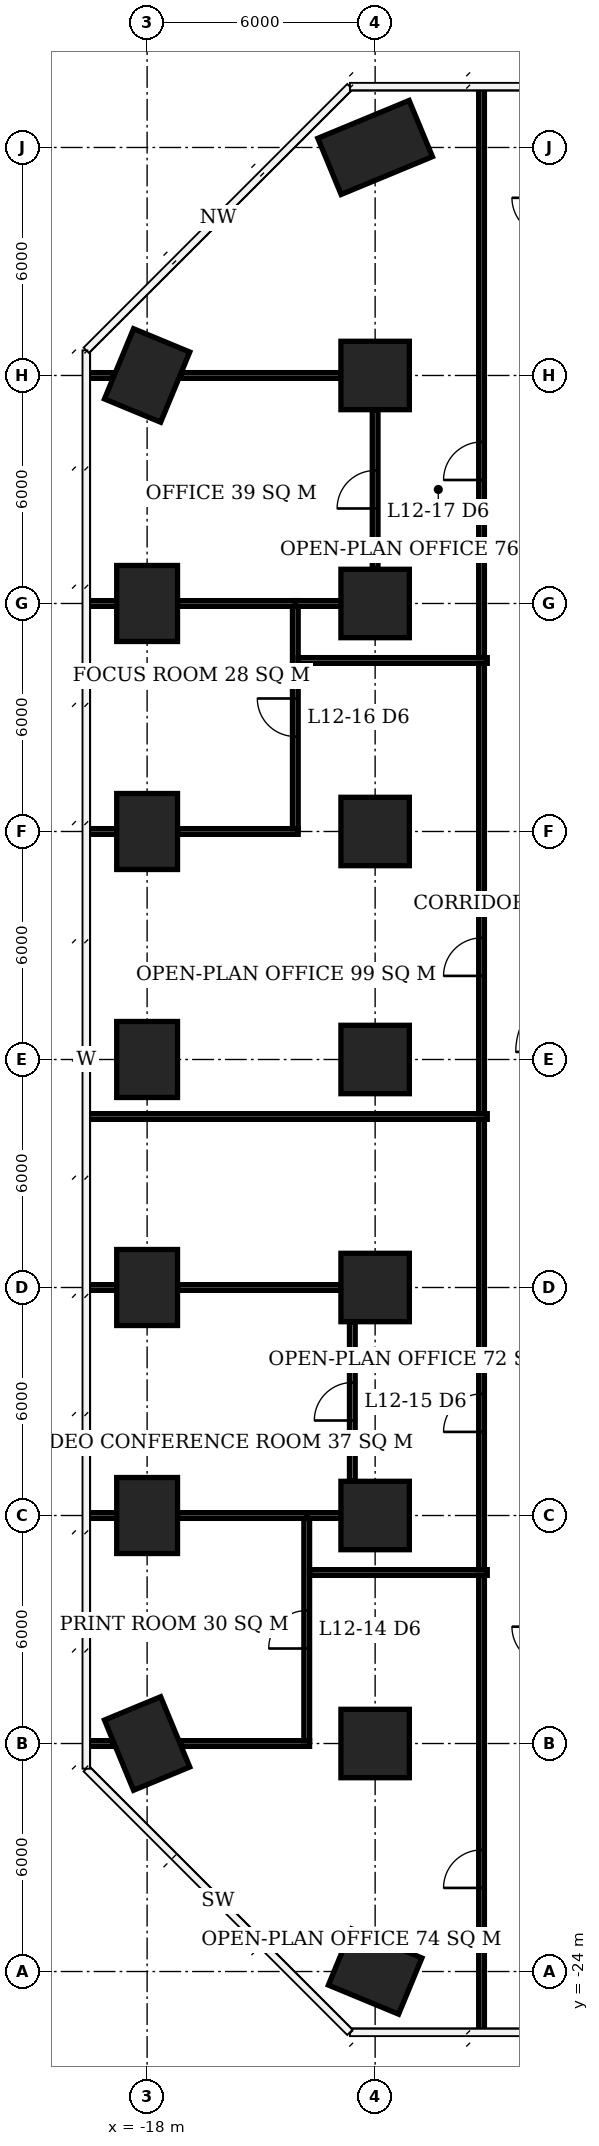
"""IFC4 building model, lengths in metres.
Left out: names, types, materials, properties, quantities, classifications, styles, units other than length and angle.
Written with IfcOpenShell. Run it as: python <this file> out.ifc"""

import sys

from ifc_helpers import new_model, si_unit, direction, frame, frame_2d, origin, origin_2d, place, context, subcontext, project, spatial, rectangle, extrude, element, fill, save


model = new_model("IFC4")
c1 = context("Model", 3, precision=1e-05, world=origin(), true_north=direction((0.0, 1.0)))
c2 = subcontext(c1, "Body", "Model", "MODEL_VIEW")
j1 = project(units=[si_unit("LENGTHUNIT", "METRE"), si_unit("PLANEANGLEUNIT", "RADIAN")], contexts=[c1])
p1 = place(None, origin())
s1 = spatial("IfcSite", under=j1, at=p1, CompositionType="ELEMENT")
p2 = place(p1, origin())
s2 = spatial("IfcBuilding", under=s1, at=p2, CompositionType="ELEMENT")
p3 = place(p2, frame((0.0, 0.0, 53.3)))
s3 = spatial("IfcBuildingStorey", under=s2, at=p3, CompositionType="ELEMENT", Elevation=53.3)
for number, where, z_axis, x_axis in (
    (1, (-18.0, -18.0, 0.0), (0.0, 0.0, 1.0), (-0.383, 0.924, 0.0)),
    (2, (-18.0, -12.0, 0.0), (0.0, 0.0, 1.0), (0.0, 1.0, 0.0)),
    (3, (-18.0, -6.0, 0.0), (0.0, 0.0, 1.0), (0.0, 1.0, 0.0)),
    (4, (-18.0, 0.0, 0.0), (0.0, 0.0, 1.0), (0.0, 1.0, 0.0)),
    (5, (-18.0, 6.0, 0.0), (0.0, 0.0, 1.0), (0.0, 1.0, 0.0)),
    (6, (-18.0, 12.0, 0.0), (0.0, 0.0, 1.0), (0.0, 1.0, 0.0)),
    (7, (-18.0, 18.0, 0.0), (0.0, 0.0, 1.0), (0.383, 0.924, 0.0)),
    (8, (-12.0, -24.0, 0.0), (0.0, 0.0, 1.0), (-0.924, 0.383, 0.0)),
):
    element("IfcColumn", number, at=place(p3, frame(where, z_axis=z_axis, x_axis=x_axis)), inside=s3, PredefinedType="COLUMN", context=c2, shape_type="SweptSolid", body=[
        extrude(rectangle(XDim=2.0, YDim=1.6, at=origin_2d()), origin(), (0.0, 0.0, 1.0), 3.9),
    ])
for number, where, z_axis, x_axis in (
    (9, (-12.0, -18.0, 0.0), (0.0, 0.0, 1.0), (1.0, 0.0, 0.0)),
    (10, (-12.0, -12.0, 0.0), (0.0, 0.0, 1.0), (1.0, 0.0, 0.0)),
    (11, (-12.0, -6.0, 0.0), (0.0, 0.0, 1.0), (1.0, 0.0, 0.0)),
    (12, (-12.0, 0.0, 0.0), (0.0, 0.0, 1.0), (1.0, 0.0, 0.0)),
    (13, (-12.0, 6.0, 0.0), (0.0, 0.0, 1.0), (1.0, 0.0, 0.0)),
    (14, (-12.0, 12.0, 0.0), (0.0, 0.0, 1.0), (1.0, 0.0, 0.0)),
    (15, (-12.0, 18.0, 0.0), (0.0, 0.0, 1.0), (1.0, 0.0, 0.0)),
):
    element("IfcColumn", number, at=place(p3, frame(where, z_axis=z_axis, x_axis=x_axis)), inside=s3, PredefinedType="COLUMN", context=c2, shape_type="SweptSolid", body=[
        extrude(rectangle(XDim=1.8, YDim=1.8, at=origin_2d()), origin(), (0.0, 0.0, 1.0), 3.9),
    ])
p4 = place(p3, frame((-12.0, 24.0, 0.0), z_axis=(0.0, 0.0, 1.0), x_axis=(0.923879532511, 0.382683432365, 0.0)))
e16 = element("IfcColumn", 16, at=p4, inside=s3, PredefinedType="COLUMN", context=c2, shape_type="SweptSolid", body=[
    extrude(rectangle(XDim=2.6, YDim=1.6, at=origin_2d()), origin(), (0.0, 0.0, 1.0), 3.9),
])
p5 = place(p3, frame((-19.6, -18.0, 0.0), z_axis=(0.0, 0.0, 1.0), x_axis=(1.0, 0.0, 0.0)))
e17 = element("IfcWall", 17, at=p5, inside=s3, PredefinedType="PARTITIONING", context=c2, shape_type="SweptSolid", body=[
    extrude(rectangle(XDim=0.703, YDim=0.15, at=frame_2d((0.352, 0.0))), origin(), (0.0, 0.0, 1.0), 3.65),
])
p6 = place(p3, frame((-17.103, -18.0, 0.0), z_axis=(0.0, 0.0, 1.0), x_axis=(1.0, 0.0, 0.0)))
e18 = element("IfcWall", 18, at=p6, inside=s3, PredefinedType="PARTITIONING", context=c2, shape_type="SweptSolid", body=[
    extrude(rectangle(XDim=3.378, YDim=0.15, at=frame_2d((1.689, 0.0))), origin(), (0.0, 0.0, 1.0), 3.65),
])
p7 = place(p3, frame((-19.6, -12.0, 0.0), z_axis=(0.0, 0.0, 1.0), x_axis=(1.0, 0.0, 0.0)))
e19 = element("IfcWall", 19, at=p7, inside=s3, PredefinedType="PARTITIONING", context=c2, shape_type="SweptSolid", body=[
    extrude(rectangle(XDim=0.8, YDim=0.15, at=frame_2d((0.4, 0.0))), origin(), (0.0, 0.0, 1.0), 3.65),
])
p8 = place(p3, frame((-17.2, -12.0, 0.0), z_axis=(0.0, 0.0, 1.0), x_axis=(1.0, 0.0, 0.0)))
e20 = element("IfcWall", 20, at=p8, inside=s3, PredefinedType="PARTITIONING", context=c2, shape_type="SweptSolid", body=[
    extrude(rectangle(XDim=3.475, YDim=0.15, at=frame_2d((1.737, 0.0))), origin(), (0.0, 0.0, 1.0), 3.65),
])
p9 = place(p3, frame((-13.8, -12.0, 0.0), z_axis=(0.0, 0.0, 1.0), x_axis=(1.0, 0.0, 0.0)))
e21 = element("IfcWall", 21, at=p9, inside=s3, PredefinedType="PARTITIONING", context=c2, shape_type="SweptSolid", body=[
    extrude(rectangle(XDim=0.9, YDim=0.15, at=frame_2d((0.45, 0.0))), origin(), (0.0, 0.0, 1.0), 3.65),
])
p10 = place(p3, frame((-19.6, -6.0, 0.0), z_axis=(0.0, 0.0, 1.0), x_axis=(1.0, 0.0, 0.0)))
e22 = element("IfcWall", 22, at=p10, inside=s3, PredefinedType="PARTITIONING", context=c2, shape_type="SweptSolid", body=[
    extrude(rectangle(XDim=0.8, YDim=0.15, at=frame_2d((0.4, 0.0))), origin(), (0.0, 0.0, 1.0), 3.65),
])
p11 = place(p3, frame((-17.2, -6.0, 0.0), z_axis=(0.0, 0.0, 1.0), x_axis=(1.0, 0.0, 0.0)))
e23 = element("IfcWall", 23, at=p11, inside=s3, PredefinedType="PARTITIONING", context=c2, shape_type="SweptSolid", body=[
    extrude(rectangle(XDim=4.3, YDim=0.15, at=frame_2d((2.15, 0.0))), origin(), (0.0, 0.0, 1.0), 3.65),
])
p12 = place(p3, frame((-19.6, 6.0, 0.0), z_axis=(0.0, 0.0, 1.0), x_axis=(1.0, 0.0, 0.0)))
e24 = element("IfcWall", 24, at=p12, inside=s3, PredefinedType="PARTITIONING", context=c2, shape_type="SweptSolid", body=[
    extrude(rectangle(XDim=0.8, YDim=0.15, at=frame_2d((0.4, 0.0))), origin(), (0.0, 0.0, 1.0), 3.65),
])
p13 = place(p3, frame((-17.2, 6.0, 0.0), z_axis=(0.0, 0.0, 1.0), x_axis=(1.0, 0.0, 0.0)))
e25 = element("IfcWall", 25, at=p13, inside=s3, PredefinedType="PARTITIONING", context=c2, shape_type="SweptSolid", body=[
    extrude(rectangle(XDim=3.175, YDim=0.15, at=frame_2d((1.587, 0.0))), origin(), (0.0, 0.0, 1.0), 3.65),
])
p14 = place(p3, frame((-19.6, 12.0, 0.0), z_axis=(0.0, 0.0, 1.0), x_axis=(1.0, 0.0, 0.0)))
e26 = element("IfcWall", 26, at=p14, inside=s3, PredefinedType="PARTITIONING", context=c2, shape_type="SweptSolid", body=[
    extrude(rectangle(XDim=0.8, YDim=0.15, at=frame_2d((0.4, 0.0))), origin(), (0.0, 0.0, 1.0), 3.65),
])
p15 = place(p3, frame((-17.2, 12.0, 0.0), z_axis=(0.0, 0.0, 1.0), x_axis=(1.0, 0.0, 0.0)))
e27 = element("IfcWall", 27, at=p15, inside=s3, PredefinedType="PARTITIONING", context=c2, shape_type="SweptSolid", body=[
    extrude(rectangle(XDim=3.175, YDim=0.15, at=frame_2d((1.587, 0.0))), origin(), (0.0, 0.0, 1.0), 3.65),
])
p16 = place(p3, frame((-14.1, 12.0, 0.0), z_axis=(0.0, 0.0, 1.0), x_axis=(1.0, 0.0, 0.0)))
e28 = element("IfcWall", 28, at=p16, inside=s3, PredefinedType="PARTITIONING", context=c2, shape_type="SweptSolid", body=[
    extrude(rectangle(XDim=1.2, YDim=0.15, at=frame_2d((0.6, 0.0))), origin(), (0.0, 0.0, 1.0), 3.65),
])
p17 = place(p3, frame((-19.6, 18.0, 0.0), z_axis=(0.0, 0.0, 1.0), x_axis=(1.0, 0.0, 0.0)))
e29 = element("IfcWall", 29, at=p17, inside=s3, PredefinedType="PARTITIONING", context=c2, shape_type="SweptSolid", body=[
    extrude(rectangle(XDim=0.703, YDim=0.15, at=frame_2d((0.352, 0.0))), origin(), (0.0, 0.0, 1.0), 3.65),
])
p18 = place(p3, frame((-17.103, 18.0, 0.0), z_axis=(0.0, 0.0, 1.0), x_axis=(1.0, 0.0, 0.0)))
e30 = element("IfcWall", 30, at=p18, inside=s3, PredefinedType="PARTITIONING", context=c2, shape_type="SweptSolid", body=[
    extrude(rectangle(XDim=4.203, YDim=0.15, at=frame_2d((2.102, 0.0))), origin(), (0.0, 0.0, 1.0), 3.65),
])
p19 = place(p3, frame((-14.1, 6.075, 0.0), z_axis=(0.0, 0.0, 1.0), x_axis=(0.0, 1.0, 0.0)))
e31 = element("IfcWall", 31, at=p19, inside=s3, PredefinedType="PARTITIONING", context=c2, shape_type="SweptSolid", body=[
    extrude(rectangle(XDim=5.85, YDim=0.15, at=frame_2d((2.925, 0.0))), origin(), (0.0, 0.0, 1.0), 3.65),
])
p20 = place(p19, frame((2.425, 0.0, 0.0)))
e32 = element("IfcOpeningElement", 32, at=p20, cuts=e31, PredefinedType="OPENING", context=c2, shape_type="SweptSolid", body=[
    extrude(rectangle(XDim=1.0, YDim=2.1, at=frame_2d((0.5, 1.05))), frame((0.0, 0.085, 0.0), z_axis=(0.0, -1.0, 0.0), x_axis=(1.0, 0.0, 0.0)), (0.0, 0.0, 1.0), 0.17),
])
p21 = place(p3, frame((-13.8, -17.925, 0.0), z_axis=(0.0, 0.0, 1.0), x_axis=(0.0, 1.0, 0.0)))
e33 = element("IfcWall", 33, at=p21, inside=s3, PredefinedType="PARTITIONING", context=c2, shape_type="SweptSolid", body=[
    extrude(rectangle(XDim=5.85, YDim=0.15, at=frame_2d((2.925, 0.0))), origin(), (0.0, 0.0, 1.0), 3.65),
])
p22 = place(p21, frame((2.425, 0.0, 0.0)))
e34 = element("IfcOpeningElement", 34, at=p22, cuts=e33, PredefinedType="OPENING", context=c2, shape_type="SweptSolid", body=[
    extrude(rectangle(XDim=1.0, YDim=2.1, at=frame_2d((0.5, 1.05))), frame((0.0, 0.085, 0.0), z_axis=(0.0, -1.0, 0.0), x_axis=(1.0, 0.0, 0.0)), (0.0, 0.0, 1.0), 0.17),
])
p23 = place(p3, frame((-12.6, -11.1, 0.0), z_axis=(0.0, 0.0, 1.0), x_axis=(0.0, 1.0, 0.0)))
e35 = element("IfcWall", 35, at=p23, inside=s3, PredefinedType="PARTITIONING", context=c2, shape_type="SweptSolid", body=[
    extrude(rectangle(XDim=4.2, YDim=0.15, at=frame_2d((2.1, 0.0))), origin(), (0.0, 0.0, 1.0), 3.65),
])
p24 = place(p23, frame((1.6, 0.0, 0.0)))
e36 = element("IfcOpeningElement", 36, at=p24, cuts=e35, PredefinedType="OPENING", context=c2, shape_type="SweptSolid", body=[
    extrude(rectangle(XDim=1.0, YDim=2.1, at=frame_2d((0.5, 1.05))), frame((0.0, 0.085, 0.0), z_axis=(0.0, -1.0, 0.0), x_axis=(1.0, 0.0, 0.0)), (0.0, 0.0, 1.0), 0.17),
])
p25 = place(p3, frame((-12.0, 12.9, 0.0), z_axis=(0.0, 0.0, 1.0), x_axis=(0.0, 1.0, 0.0)))
e37 = element("IfcWall", 37, at=p25, inside=s3, PredefinedType="PARTITIONING", context=c2, shape_type="SweptSolid", body=[
    extrude(rectangle(XDim=4.2, YDim=0.15, at=frame_2d((2.1, 0.0))), origin(), (0.0, 0.0, 1.0), 3.65),
])
p26 = place(p25, frame((1.6, 0.0, 0.0)))
e38 = element("IfcOpeningElement", 38, at=p26, cuts=e37, PredefinedType="OPENING", context=c2, shape_type="SweptSolid", body=[
    extrude(rectangle(XDim=1.0, YDim=2.1, at=frame_2d((0.5, 1.05))), frame((0.0, 0.085, 0.0), z_axis=(0.0, -1.0, 0.0), x_axis=(1.0, 0.0, 0.0)), (0.0, 0.0, 1.0), 0.17),
])
p27 = place(p3, frame((-19.6, -1.5, 0.0), z_axis=(0.0, 0.0, 1.0), x_axis=(1.0, 0.0, 0.0)))
e39 = element("IfcWall", 39, at=p27, inside=s3, PredefinedType="PARTITIONING", context=c2, shape_type="SweptSolid", body=[
    extrude(rectangle(XDim=10.55, YDim=0.15, at=frame_2d((5.275, 0.0))), origin(), (0.0, 0.0, 1.0), 3.65),
])
p28 = place(p3, frame((-14.025, 10.5, 0.0), z_axis=(0.0, 0.0, 1.0), x_axis=(1.0, 0.0, 0.0)))
e40 = element("IfcWall", 40, at=p28, inside=s3, PredefinedType="PARTITIONING", context=c2, shape_type="SweptSolid", body=[
    extrude(rectangle(XDim=4.975, YDim=0.15, at=frame_2d((2.487, 0.0))), origin(), (0.0, 0.0, 1.0), 3.65),
])
p29 = place(p3, frame((-13.725, -13.5, 0.0), z_axis=(0.0, 0.0, 1.0), x_axis=(1.0, 0.0, 0.0)))
e41 = element("IfcWall", 41, at=p29, inside=s3, PredefinedType="PARTITIONING", context=c2, shape_type="SweptSolid", body=[
    extrude(rectangle(XDim=4.675, YDim=0.15, at=frame_2d((2.337, 0.0))), origin(), (0.0, 0.0, 1.0), 3.65),
])
p30 = place(p3, frame((-9.2, -25.6, 0.0), z_axis=(0.0, 0.0, 1.0), x_axis=(0.0, 1.0, 0.0)))
e42 = element("IfcWall", 42, at=p30, inside=s3, PredefinedType="PARTITIONING", context=c2, shape_type="SweptSolid", body=[
    extrude(rectangle(XDim=12.025, YDim=0.15, at=frame_2d((6.013, 0.0))), origin(), (0.0, 0.0, 1.0), 3.65),
])
p31 = place(p30, frame((3.8, 0.0, 0.0)))
e43 = element("IfcOpeningElement", 43, at=p31, cuts=e42, PredefinedType="OPENING", context=c2, shape_type="SweptSolid", body=[
    extrude(rectangle(XDim=1.0, YDim=2.1, at=frame_2d((0.5, 1.05))), frame((0.0, 0.085, 0.0), z_axis=(0.0, -1.0, 0.0), x_axis=(1.0, 0.0, 0.0)), (0.0, 0.0, 1.0), 0.17),
])
p32 = place(p3, frame((-9.2, -13.425, 0.0), z_axis=(0.0, 0.0, 1.0), x_axis=(0.0, 1.0, 0.0)))
e44 = element("IfcWall", 44, at=p32, inside=s3, PredefinedType="PARTITIONING", context=c2, shape_type="SweptSolid", body=[
    extrude(rectangle(XDim=11.85, YDim=0.15, at=frame_2d((5.925, 0.0))), origin(), (0.0, 0.0, 1.0), 3.65),
])
p33 = place(p32, frame((3.625, 0.0, 0.0)))
e45 = element("IfcOpeningElement", 45, at=p33, cuts=e44, PredefinedType="OPENING", context=c2, shape_type="SweptSolid", body=[
    extrude(rectangle(XDim=1.0, YDim=2.1, at=frame_2d((0.5, 1.05))), frame((0.0, 0.085, 0.0), z_axis=(0.0, -1.0, 0.0), x_axis=(1.0, 0.0, 0.0)), (0.0, 0.0, 1.0), 0.17),
])
p34 = place(p3, frame((-9.2, -1.425, 0.0), z_axis=(0.0, 0.0, 1.0), x_axis=(0.0, 1.0, 0.0)))
e46 = element("IfcWall", 46, at=p34, inside=s3, PredefinedType="PARTITIONING", context=c2, shape_type="SweptSolid", body=[
    extrude(rectangle(XDim=11.85, YDim=0.15, at=frame_2d((5.925, 0.0))), origin(), (0.0, 0.0, 1.0), 3.65),
])
p35 = place(p34, frame((3.625, 0.0, 0.0)))
e47 = element("IfcOpeningElement", 47, at=p35, cuts=e46, PredefinedType="OPENING", context=c2, shape_type="SweptSolid", body=[
    extrude(rectangle(XDim=1.0, YDim=2.1, at=frame_2d((0.5, 1.05))), frame((0.0, 0.085, 0.0), z_axis=(0.0, -1.0, 0.0), x_axis=(1.0, 0.0, 0.0)), (0.0, 0.0, 1.0), 0.17),
])
p36 = place(p3, frame((-9.2, 10.575, 0.0), z_axis=(0.0, 0.0, 1.0), x_axis=(0.0, 1.0, 0.0)))
e48 = element("IfcWall", 48, at=p36, inside=s3, PredefinedType="PARTITIONING", context=c2, shape_type="SweptSolid", body=[
    extrude(rectangle(XDim=15.025, YDim=0.15, at=frame_2d((7.513, 0.0))), origin(), (0.0, 0.0, 1.0), 3.65),
])
p37 = place(p36, frame((4.675, 0.0, 0.0)))
e49 = element("IfcOpeningElement", 49, at=p37, cuts=e48, PredefinedType="OPENING", context=c2, shape_type="SweptSolid", body=[
    extrude(rectangle(XDim=1.0, YDim=2.1, at=frame_2d((0.5, 1.05))), frame((0.0, 0.085, 0.0), z_axis=(0.0, -1.0, 0.0), x_axis=(1.0, 0.0, 0.0)), (0.0, 0.0, 1.0), 0.17),
])
p38 = place(p22, origin())
e50 = element("IfcDoor", 50, at=p38, inside=s3, OperationType="SINGLE_SWING_LEFT", PredefinedType="DOOR", context=c2, shape_type="SweptSolid", body=[
    extrude(rectangle(XDim=1.0, YDim=2.1, at=frame_2d((0.5, 1.05))), frame((0.0, 0.025, 0.0), z_axis=(0.0, -1.0, 0.0), x_axis=(1.0, 0.0, 0.0)), (0.0, 0.0, 1.0), 0.05),
])
fill(e34, e50)
p39 = place(p24, origin())
e51 = element("IfcDoor", 51, at=p39, inside=s3, OperationType="SINGLE_SWING_LEFT", PredefinedType="DOOR", context=c2, shape_type="SweptSolid", body=[
    extrude(rectangle(XDim=1.0, YDim=2.1, at=frame_2d((0.5, 1.05))), frame((0.0, 0.025, 0.0), z_axis=(0.0, -1.0, 0.0), x_axis=(1.0, 0.0, 0.0)), (0.0, 0.0, 1.0), 0.05),
])
fill(e36, e51)
p40 = place(p20, origin())
e52 = element("IfcDoor", 52, at=p40, inside=s3, OperationType="SINGLE_SWING_RIGHT", PredefinedType="DOOR", context=c2, shape_type="SweptSolid", body=[
    extrude(rectangle(XDim=1.0, YDim=2.1, at=frame_2d((0.5, 1.05))), frame((0.0, 0.025, 0.0), z_axis=(0.0, -1.0, 0.0), x_axis=(1.0, 0.0, 0.0)), (0.0, 0.0, 1.0), 0.05),
])
fill(e32, e52)
p41 = place(p26, origin())
e53 = element("IfcDoor", 53, at=p41, inside=s3, OperationType="SINGLE_SWING_LEFT", PredefinedType="DOOR", context=c2, shape_type="SweptSolid", body=[
    extrude(rectangle(XDim=1.0, YDim=2.1, at=frame_2d((0.5, 1.05))), frame((0.0, 0.025, 0.0), z_axis=(0.0, -1.0, 0.0), x_axis=(1.0, 0.0, 0.0)), (0.0, 0.0, 1.0), 0.05),
])
fill(e38, e53)
p42 = place(p31, origin())
e54 = element("IfcDoor", 54, at=p42, inside=s3, OperationType="SINGLE_SWING_LEFT", PredefinedType="DOOR", context=c2, shape_type="SweptSolid", body=[
    extrude(rectangle(XDim=1.0, YDim=2.1, at=frame_2d((0.5, 1.05))), frame((0.0, 0.025, 0.0), z_axis=(0.0, -1.0, 0.0), x_axis=(1.0, 0.0, 0.0)), (0.0, 0.0, 1.0), 0.05),
])
fill(e43, e54)
p43 = place(p33, origin())
e55 = element("IfcDoor", 55, at=p43, inside=s3, OperationType="SINGLE_SWING_LEFT", PredefinedType="DOOR", context=c2, shape_type="SweptSolid", body=[
    extrude(rectangle(XDim=1.0, YDim=2.1, at=frame_2d((0.5, 1.05))), frame((0.0, 0.025, 0.0), z_axis=(0.0, -1.0, 0.0), x_axis=(1.0, 0.0, 0.0)), (0.0, 0.0, 1.0), 0.05),
])
fill(e45, e55)
p44 = place(p35, origin())
e56 = element("IfcDoor", 56, at=p44, inside=s3, OperationType="SINGLE_SWING_LEFT", PredefinedType="DOOR", context=c2, shape_type="SweptSolid", body=[
    extrude(rectangle(XDim=1.0, YDim=2.1, at=frame_2d((0.5, 1.05))), frame((0.0, 0.025, 0.0), z_axis=(0.0, -1.0, 0.0), x_axis=(1.0, 0.0, 0.0)), (0.0, 0.0, 1.0), 0.05),
])
fill(e47, e56)
p45 = place(p37, origin())
e57 = element("IfcDoor", 57, at=p45, inside=s3, OperationType="SINGLE_SWING_LEFT", PredefinedType="DOOR", context=c2, shape_type="SweptSolid", body=[
    extrude(rectangle(XDim=1.0, YDim=2.1, at=frame_2d((0.5, 1.05))), frame((0.0, 0.025, 0.0), z_axis=(0.0, -1.0, 0.0), x_axis=(1.0, 0.0, 0.0)), (0.0, 0.0, 1.0), 0.05),
])
fill(e49, e57)
save(model, sys.argv[1])
